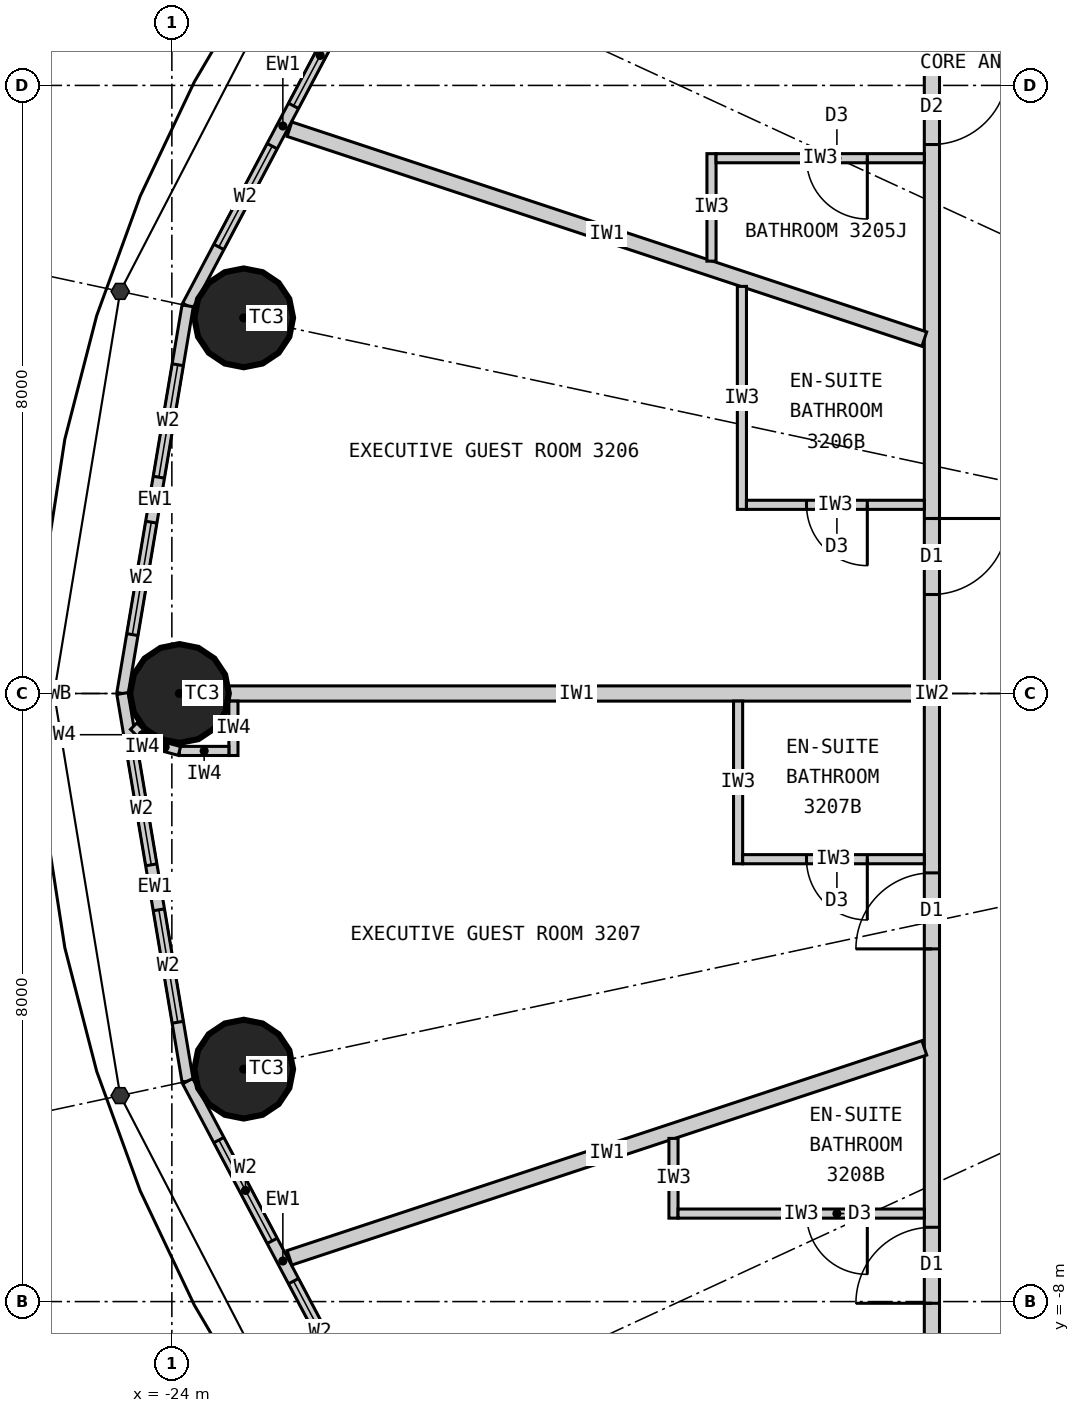
"""IFC4 building model, lengths in metres.
Left out: names, types, materials, properties, quantities, classifications, styles, units other than length and angle.
Written with IfcOpenShell. Run it as: python <this file> out.ifc"""

import sys

from ifc_helpers import new_model, si_unit, direction, frame, frame_2d, origin, origin_2d, place, context, subcontext, project, spatial, rectangle, circle, extrude, element, fill, save


model = new_model("IFC4")
c1 = context("Model", 3, precision=1e-05, world=origin(), true_north=direction((0.0, 1.0)))
c2 = subcontext(c1, "Body", "Model", "MODEL_VIEW")
j1 = project(units=[si_unit("LENGTHUNIT", "METRE"), si_unit("PLANEANGLEUNIT", "RADIAN")], contexts=[c1])
p1 = place(None, origin())
s1 = spatial("IfcSite", under=j1, at=p1, CompositionType="ELEMENT")
p2 = place(p1, origin())
s2 = spatial("IfcBuilding", under=s1, at=p2, CompositionType="ELEMENT")
p3 = place(p2, frame((0.0, 0.0, 125.4)))
s3 = spatial("IfcBuildingStorey", under=s2, at=p3, CompositionType="ELEMENT", Elevation=125.4)
for number, where, z_axis, x_axis in (
    (1, (-23.055, 4.942, 0.0), (0.0, 0.0, 1.0), (1.0, 0.0, 0.0)),
    (2, (-23.9, 0.0, 0.0), (0.0, 0.0, 1.0), (1.0, 0.0, 0.0)),
    (3, (-23.055, -4.942, 0.0), (0.0, 0.0, 1.0), (1.0, 0.0, 0.0)),
):
    element("IfcColumn", number, at=place(p3, frame(where, z_axis=z_axis, x_axis=x_axis)), inside=s3, PredefinedType="COLUMN", context=c2, shape_type="SweptSolid", body=[
        extrude(circle(Radius=0.65, at=origin_2d()), origin(), (0.0, 0.0, 1.0), 3.3),
    ])
p4 = place(p3, frame((-21.287, 9.832, 0.0), z_axis=(0.0, 0.0, 1.0), x_axis=(-0.467814388454, -0.883826735257, 0.0)))
e4 = element("IfcWall", 4, at=p4, inside=s3, PredefinedType="ELEMENTEDWALL", context=c2, shape_type="SweptSolid", body=[
    extrude(rectangle(XDim=5.354, YDim=0.15, at=frame_2d((2.677, 0.0))), origin(), (0.0, 0.0, 1.0), 3.12),
])
p5 = place(p4, frame((0.877, 0.0, 0.9)))
e5 = element("IfcOpeningElement", 5, at=p5, cuts=e4, PredefinedType="OPENING", context=c2, shape_type="SweptSolid", body=[
    extrude(rectangle(XDim=1.5, YDim=1.9, at=frame_2d((0.75, 0.95))), frame((0.0, 0.085, 0.0), z_axis=(0.0, -1.0, 0.0), x_axis=(1.0, 0.0, 0.0)), (0.0, 0.0, 1.0), 0.17),
])
p6 = place(p4, frame((2.977, 0.0, 0.9)))
e6 = element("IfcOpeningElement", 6, at=p6, cuts=e4, PredefinedType="OPENING", context=c2, shape_type="SweptSolid", body=[
    extrude(rectangle(XDim=1.5, YDim=1.9, at=frame_2d((0.75, 0.95))), frame((0.0, 0.085, 0.0), z_axis=(0.0, -1.0, 0.0), x_axis=(1.0, 0.0, 0.0)), (0.0, 0.0, 1.0), 0.17),
])
p7 = place(p3, frame((-23.792, 5.1, 0.0), z_axis=(0.0, 0.0, 1.0), x_axis=(-0.165883894218, -0.986145290329, 0.0)))
e7 = element("IfcWall", 7, at=p7, inside=s3, PredefinedType="ELEMENTEDWALL", context=c2, shape_type="SweptSolid", body=[
    extrude(rectangle(XDim=5.172, YDim=0.15, at=frame_2d((2.586, 0.0))), origin(), (0.0, 0.0, 1.0), 3.12),
])
p8 = place(p7, frame((0.786, 0.0, 0.9)))
e8 = element("IfcOpeningElement", 8, at=p8, cuts=e7, PredefinedType="OPENING", context=c2, shape_type="SweptSolid", body=[
    extrude(rectangle(XDim=1.5, YDim=1.9, at=frame_2d((0.75, 0.95))), frame((0.0, 0.085, 0.0), z_axis=(0.0, -1.0, 0.0), x_axis=(1.0, 0.0, 0.0)), (0.0, 0.0, 1.0), 0.17),
])
p9 = place(p7, frame((2.886, 0.0, 0.9)))
e9 = element("IfcOpeningElement", 9, at=p9, cuts=e7, PredefinedType="OPENING", context=c2, shape_type="SweptSolid", body=[
    extrude(rectangle(XDim=1.5, YDim=1.9, at=frame_2d((0.75, 0.95))), frame((0.0, 0.085, 0.0), z_axis=(0.0, -1.0, 0.0), x_axis=(1.0, 0.0, 0.0)), (0.0, 0.0, 1.0), 0.17),
])
p10 = place(p3, frame((-24.65, 0.0, 0.0), z_axis=(0.0, 0.0, 1.0), x_axis=(0.165883894218, -0.986145290329, 0.0)))
e10 = element("IfcWall", 10, at=p10, inside=s3, PredefinedType="ELEMENTEDWALL", context=c2, shape_type="SweptSolid", body=[
    extrude(rectangle(XDim=5.172, YDim=0.15, at=frame_2d((2.586, 0.0))), origin(), (0.0, 0.0, 1.0), 3.12),
])
p11 = place(p10, frame((0.786, 0.0, 0.9)))
e11 = element("IfcOpeningElement", 11, at=p11, cuts=e10, PredefinedType="OPENING", context=c2, shape_type="SweptSolid", body=[
    extrude(rectangle(XDim=1.5, YDim=1.9, at=frame_2d((0.75, 0.95))), frame((0.0, 0.085, 0.0), z_axis=(0.0, -1.0, 0.0), x_axis=(1.0, 0.0, 0.0)), (0.0, 0.0, 1.0), 0.17),
])
p12 = place(p10, frame((2.886, 0.0, 0.9)))
e12 = element("IfcOpeningElement", 12, at=p12, cuts=e10, PredefinedType="OPENING", context=c2, shape_type="SweptSolid", body=[
    extrude(rectangle(XDim=1.5, YDim=1.9, at=frame_2d((0.75, 0.95))), frame((0.0, 0.085, 0.0), z_axis=(0.0, -1.0, 0.0), x_axis=(1.0, 0.0, 0.0)), (0.0, 0.0, 1.0), 0.17),
])
p13 = place(p3, frame((-23.792, -5.1, 0.0), z_axis=(0.0, 0.0, 1.0), x_axis=(0.467814388454, -0.883826735257, 0.0)))
e13 = element("IfcWall", 13, at=p13, inside=s3, PredefinedType="ELEMENTEDWALL", context=c2, shape_type="SweptSolid", body=[
    extrude(rectangle(XDim=5.354, YDim=0.15, at=frame_2d((2.677, 0.0))), origin(), (0.0, 0.0, 1.0), 3.12),
])
p14 = place(p13, frame((0.877, 0.0, 0.9)))
e14 = element("IfcOpeningElement", 14, at=p14, cuts=e13, PredefinedType="OPENING", context=c2, shape_type="SweptSolid", body=[
    extrude(rectangle(XDim=1.5, YDim=1.9, at=frame_2d((0.75, 0.95))), frame((0.0, 0.085, 0.0), z_axis=(0.0, -1.0, 0.0), x_axis=(1.0, 0.0, 0.0)), (0.0, 0.0, 1.0), 0.17),
])
p15 = place(p13, frame((2.977, 0.0, 0.9)))
e15 = element("IfcOpeningElement", 15, at=p15, cuts=e13, PredefinedType="OPENING", context=c2, shape_type="SweptSolid", body=[
    extrude(rectangle(XDim=1.5, YDim=1.9, at=frame_2d((0.75, 0.95))), frame((0.0, 0.085, 0.0), z_axis=(0.0, -1.0, 0.0), x_axis=(1.0, 0.0, 0.0)), (0.0, 0.0, 1.0), 0.17),
])
p16 = place(p3, frame((-14.0, 9.9, 0.0), z_axis=(0.0, 0.0, 1.0), x_axis=(0.0, -1.0, 0.0)))
e16 = element("IfcWall", 16, at=p16, inside=s3, PredefinedType="PARTITIONING", context=c2, shape_type="SweptSolid", body=[
    extrude(rectangle(XDim=19.8, YDim=0.2, at=frame_2d((9.9, 0.0))), origin(), (0.0, 0.0, 1.0), 3.12),
])
p17 = place(p16, frame((1.678, 0.0, 0.0)))
e17 = element("IfcOpeningElement", 17, at=p17, cuts=e16, PredefinedType="OPENING", context=c2, shape_type="SweptSolid", body=[
    extrude(rectangle(XDim=1.0, YDim=2.2, at=frame_2d((0.5, 1.1))), frame((0.0, 0.11, 0.0), z_axis=(0.0, -1.0, 0.0), x_axis=(1.0, 0.0, 0.0)), (0.0, 0.0, 1.0), 0.22),
])
p18 = place(p16, frame((7.598, 0.0, 0.0)))
e18 = element("IfcOpeningElement", 18, at=p18, cuts=e16, PredefinedType="OPENING", context=c2, shape_type="SweptSolid", body=[
    extrude(rectangle(XDim=1.0, YDim=2.2, at=frame_2d((0.5, 1.1))), frame((0.0, 0.11, 0.0), z_axis=(0.0, -1.0, 0.0), x_axis=(1.0, 0.0, 0.0)), (0.0, 0.0, 1.0), 0.22),
])
p19 = place(p16, frame((12.26, 0.0, 0.0)))
e19 = element("IfcOpeningElement", 19, at=p19, cuts=e16, PredefinedType="OPENING", context=c2, shape_type="SweptSolid", body=[
    extrude(rectangle(XDim=1.0, YDim=2.2, at=frame_2d((0.5, 1.1))), frame((0.0, 0.11, 0.0), z_axis=(0.0, -1.0, 0.0), x_axis=(1.0, 0.0, 0.0)), (0.0, 0.0, 1.0), 0.22),
])
p20 = place(p16, frame((16.922, 0.0, 0.0)))
e20 = element("IfcOpeningElement", 20, at=p20, cuts=e16, PredefinedType="OPENING", context=c2, shape_type="SweptSolid", body=[
    extrude(rectangle(XDim=1.0, YDim=2.2, at=frame_2d((0.5, 1.1))), frame((0.0, 0.11, 0.0), z_axis=(0.0, -1.0, 0.0), x_axis=(1.0, 0.0, 0.0)), (0.0, 0.0, 1.0), 0.22),
])
p21 = place(p3, frame((-14.1, 4.662, 0.0), z_axis=(0.0, 0.0, 1.0), x_axis=(-0.949446466373, 0.313928984789, 0.0)))
e21 = element("IfcWall", 21, at=p21, inside=s3, PredefinedType="PARTITIONING", context=c2, shape_type="SweptSolid", body=[
    extrude(rectangle(XDim=8.797, YDim=0.2, at=frame_2d((4.399, 0.0))), origin(), (0.0, 0.0, 1.0), 3.12),
])
p22 = place(p3, frame((-14.1, 0.0, 0.0), z_axis=(0.0, 0.0, 1.0), x_axis=(-1.0, 0.0, 0.0)))
e22 = element("IfcWall", 22, at=p22, inside=s3, PredefinedType="PARTITIONING", context=c2, shape_type="SweptSolid", body=[
    extrude(rectangle(XDim=9.15, YDim=0.2, at=frame_2d((4.575, 0.0))), origin(), (0.0, 0.0, 1.0), 2.32),
])
p23 = place(p3, frame((-14.1, -4.662, 0.0), z_axis=(0.0, 0.0, 1.0), x_axis=(-0.949446466373, -0.313928984789, 0.0)))
e23 = element("IfcWall", 23, at=p23, inside=s3, PredefinedType="PARTITIONING", context=c2, shape_type="SweptSolid", body=[
    extrude(rectangle(XDim=8.797, YDim=0.2, at=frame_2d((4.399, 0.0))), origin(), (0.0, 0.0, 1.0), 3.12),
])
p24 = place(p3, frame((-16.9, 5.688, 0.0), z_axis=(0.0, 0.0, 1.0), x_axis=(0.0, 1.0, 0.0)))
e24 = element("IfcWall", 24, at=p24, inside=s3, PredefinedType="PARTITIONING", context=c2, shape_type="SweptSolid", body=[
    extrude(rectangle(XDim=1.414, YDim=0.12, at=frame_2d((0.707, 0.0))), origin(), (0.0, 0.0, 1.0), 3.12),
])
p25 = place(p3, frame((-14.1, 7.042, 0.0), z_axis=(0.0, 0.0, 1.0), x_axis=(-1.0, 0.0, 0.0)))
e25 = element("IfcWall", 25, at=p25, inside=s3, PredefinedType="PARTITIONING", context=c2, shape_type="SweptSolid", body=[
    extrude(rectangle(XDim=2.74, YDim=0.12, at=frame_2d((1.37, 0.0))), origin(), (0.0, 0.0, 1.0), 3.12),
])
p26 = place(p25, frame((0.75, 0.0, 0.0)))
e26 = element("IfcOpeningElement", 26, at=p26, cuts=e25, PredefinedType="OPENING", context=c2, shape_type="SweptSolid", body=[
    extrude(rectangle(XDim=0.8, YDim=2.1, at=frame_2d((0.4, 1.05))), frame((0.0, 0.07, 0.0), z_axis=(0.0, -1.0, 0.0), x_axis=(1.0, 0.0, 0.0)), (0.0, 0.0, 1.0), 0.14),
])
p27 = place(p3, frame((-16.5, 5.356, 0.0), z_axis=(0.0, 0.0, 1.0), x_axis=(0.0, -1.0, 0.0)))
e27 = element("IfcWall", 27, at=p27, inside=s3, PredefinedType="PARTITIONING", context=c2, shape_type="SweptSolid", body=[
    extrude(rectangle(XDim=2.934, YDim=0.12, at=frame_2d((1.467, 0.0))), origin(), (0.0, 0.0, 1.0), 3.12),
])
p28 = place(p3, frame((-14.1, 2.482, 0.0), z_axis=(0.0, 0.0, 1.0), x_axis=(-1.0, 0.0, 0.0)))
e28 = element("IfcWall", 28, at=p28, inside=s3, PredefinedType="PARTITIONING", context=c2, shape_type="SweptSolid", body=[
    extrude(rectangle(XDim=2.34, YDim=0.12, at=frame_2d((1.17, 0.0))), origin(), (0.0, 0.0, 1.0), 3.12),
])
p29 = place(p28, frame((0.75, 0.0, 0.0)))
e29 = element("IfcOpeningElement", 29, at=p29, cuts=e28, PredefinedType="OPENING", context=c2, shape_type="SweptSolid", body=[
    extrude(rectangle(XDim=0.8, YDim=2.1, at=frame_2d((0.4, 1.05))), frame((0.0, 0.07, 0.0), z_axis=(0.0, -1.0, 0.0), x_axis=(1.0, 0.0, 0.0)), (0.0, 0.0, 1.0), 0.14),
])
p30 = place(p3, frame((-16.55, -0.1, 0.0), z_axis=(0.0, 0.0, 1.0), x_axis=(0.0, -1.0, 0.0)))
e30 = element("IfcWall", 30, at=p30, inside=s3, PredefinedType="PARTITIONING", context=c2, shape_type="SweptSolid", body=[
    extrude(rectangle(XDim=2.14, YDim=0.12, at=frame_2d((1.07, 0.0))), origin(), (0.0, 0.0, 1.0), 3.12),
])
p31 = place(p3, frame((-14.1, -2.18, 0.0), z_axis=(0.0, 0.0, 1.0), x_axis=(-1.0, 0.0, 0.0)))
e31 = element("IfcWall", 31, at=p31, inside=s3, PredefinedType="PARTITIONING", context=c2, shape_type="SweptSolid", body=[
    extrude(rectangle(XDim=2.39, YDim=0.12, at=frame_2d((1.195, 0.0))), origin(), (0.0, 0.0, 1.0), 3.12),
])
p32 = place(p31, frame((0.75, 0.0, 0.0)))
e32 = element("IfcOpeningElement", 32, at=p32, cuts=e31, PredefinedType="OPENING", context=c2, shape_type="SweptSolid", body=[
    extrude(rectangle(XDim=0.8, YDim=2.1, at=frame_2d((0.4, 1.05))), frame((0.0, 0.07, 0.0), z_axis=(0.0, -1.0, 0.0), x_axis=(1.0, 0.0, 0.0)), (0.0, 0.0, 1.0), 0.14),
])
p33 = place(p3, frame((-17.4, -5.854, 0.0), z_axis=(0.0, 0.0, 1.0), x_axis=(0.0, -1.0, 0.0)))
e33 = element("IfcWall", 33, at=p33, inside=s3, PredefinedType="PARTITIONING", context=c2, shape_type="SweptSolid", body=[
    extrude(rectangle(XDim=1.049, YDim=0.12, at=frame_2d((0.524, 0.0))), origin(), (0.0, 0.0, 1.0), 3.12),
])
p34 = place(p3, frame((-14.1, -6.842, 0.0), z_axis=(0.0, 0.0, 1.0), x_axis=(-1.0, 0.0, 0.0)))
e34 = element("IfcWall", 34, at=p34, inside=s3, PredefinedType="PARTITIONING", context=c2, shape_type="SweptSolid", body=[
    extrude(rectangle(XDim=3.24, YDim=0.12, at=frame_2d((1.62, 0.0))), origin(), (0.0, 0.0, 1.0), 3.12),
])
p35 = place(p34, frame((0.75, 0.0, 0.0)))
e35 = element("IfcOpeningElement", 35, at=p35, cuts=e34, PredefinedType="OPENING", context=c2, shape_type="SweptSolid", body=[
    extrude(rectangle(XDim=0.8, YDim=2.1, at=frame_2d((0.4, 1.05))), frame((0.0, 0.07, 0.0), z_axis=(0.0, -1.0, 0.0), x_axis=(1.0, 0.0, 0.0)), (0.0, 0.0, 1.0), 0.14),
])
p36 = place(p3, frame((-23.19, -0.1, 0.0), z_axis=(0.0, 0.0, 1.0), x_axis=(0.0, -1.0, 0.0)))
e36 = element("IfcWall", 36, at=p36, inside=s3, PredefinedType="PARTITIONING", context=c2, shape_type="SweptSolid", body=[
    extrude(rectangle(XDim=0.716, YDim=0.12, at=frame_2d((0.358, 0.0))), origin(), (0.0, 0.0, 1.0), 3.12),
])
p37 = place(p3, frame((-23.25, -0.756, 0.0), z_axis=(0.0, 0.0, 1.0), x_axis=(-1.0, 0.0, 0.0)))
e37 = element("IfcWall", 37, at=p37, inside=s3, PredefinedType="PARTITIONING", context=c2, shape_type="SweptSolid", body=[
    extrude(rectangle(XDim=0.65, YDim=0.12, at=frame_2d((0.325, 0.0))), origin(), (0.0, 0.0, 1.0), 3.12),
])
p38 = place(p3, frame((-23.9, -0.756, 0.0), z_axis=(0.0, 0.0, 1.0), x_axis=(-0.965892334856, 0.2589440045, 0.0)))
e38 = element("IfcWall", 38, at=p38, inside=s3, PredefinedType="PARTITIONING", context=c2, shape_type="SweptSolid", body=[
    extrude(rectangle(XDim=0.391, YDim=0.12, at=frame_2d((0.196, 0.0))), origin(), (0.0, 0.0, 1.0), 3.12),
])
p39 = place(p3, frame((-24.278, -0.655, 0.0), z_axis=(0.0, 0.0, 1.0), x_axis=(-0.707106781187, 0.707106781187, 0.0)))
e39 = element("IfcWall", 39, at=p39, inside=s3, PredefinedType="PARTITIONING", context=c2, shape_type="SweptSolid", body=[
    extrude(rectangle(XDim=0.318, YDim=0.12, at=frame_2d((0.159, 0.0))), origin(), (0.0, 0.0, 1.0), 3.12),
])
p40 = place(p5, origin())
e40 = element("IfcWindow", 40, at=p40, inside=s3, PartitioningType="SINGLE_PANEL", PredefinedType="WINDOW", context=c2, shape_type="SweptSolid", body=[
    extrude(rectangle(XDim=1.5, YDim=1.9, at=frame_2d((0.75, 0.95))), frame((0.0, 0.03, 0.0), z_axis=(0.0, -1.0, 0.0), x_axis=(1.0, 0.0, 0.0)), (0.0, 0.0, 1.0), 0.06),
])
fill(e5, e40)
p41 = place(p6, origin())
e41 = element("IfcWindow", 41, at=p41, inside=s3, PartitioningType="SINGLE_PANEL", PredefinedType="WINDOW", context=c2, shape_type="SweptSolid", body=[
    extrude(rectangle(XDim=1.5, YDim=1.9, at=frame_2d((0.75, 0.95))), frame((0.0, 0.03, 0.0), z_axis=(0.0, -1.0, 0.0), x_axis=(1.0, 0.0, 0.0)), (0.0, 0.0, 1.0), 0.06),
])
fill(e6, e41)
p42 = place(p8, origin())
e42 = element("IfcWindow", 42, at=p42, inside=s3, PartitioningType="SINGLE_PANEL", PredefinedType="WINDOW", context=c2, shape_type="SweptSolid", body=[
    extrude(rectangle(XDim=1.5, YDim=1.9, at=frame_2d((0.75, 0.95))), frame((0.0, 0.03, 0.0), z_axis=(0.0, -1.0, 0.0), x_axis=(1.0, 0.0, 0.0)), (0.0, 0.0, 1.0), 0.06),
])
fill(e8, e42)
p43 = place(p9, origin())
e43 = element("IfcWindow", 43, at=p43, inside=s3, PartitioningType="SINGLE_PANEL", PredefinedType="WINDOW", context=c2, shape_type="SweptSolid", body=[
    extrude(rectangle(XDim=1.5, YDim=1.9, at=frame_2d((0.75, 0.95))), frame((0.0, 0.03, 0.0), z_axis=(0.0, -1.0, 0.0), x_axis=(1.0, 0.0, 0.0)), (0.0, 0.0, 1.0), 0.06),
])
fill(e9, e43)
p44 = place(p11, origin())
e44 = element("IfcWindow", 44, at=p44, inside=s3, PartitioningType="SINGLE_PANEL", PredefinedType="WINDOW", context=c2, shape_type="SweptSolid", body=[
    extrude(rectangle(XDim=1.5, YDim=1.9, at=frame_2d((0.75, 0.95))), frame((0.0, 0.03, 0.0), z_axis=(0.0, -1.0, 0.0), x_axis=(1.0, 0.0, 0.0)), (0.0, 0.0, 1.0), 0.06),
])
fill(e11, e44)
p45 = place(p12, origin())
e45 = element("IfcWindow", 45, at=p45, inside=s3, PartitioningType="SINGLE_PANEL", PredefinedType="WINDOW", context=c2, shape_type="SweptSolid", body=[
    extrude(rectangle(XDim=1.5, YDim=1.9, at=frame_2d((0.75, 0.95))), frame((0.0, 0.03, 0.0), z_axis=(0.0, -1.0, 0.0), x_axis=(1.0, 0.0, 0.0)), (0.0, 0.0, 1.0), 0.06),
])
fill(e12, e45)
p46 = place(p14, origin())
e46 = element("IfcWindow", 46, at=p46, inside=s3, PartitioningType="SINGLE_PANEL", PredefinedType="WINDOW", context=c2, shape_type="SweptSolid", body=[
    extrude(rectangle(XDim=1.5, YDim=1.9, at=frame_2d((0.75, 0.95))), frame((0.0, 0.03, 0.0), z_axis=(0.0, -1.0, 0.0), x_axis=(1.0, 0.0, 0.0)), (0.0, 0.0, 1.0), 0.06),
])
fill(e14, e46)
p47 = place(p15, origin())
e47 = element("IfcWindow", 47, at=p47, inside=s3, PartitioningType="SINGLE_PANEL", PredefinedType="WINDOW", context=c2, shape_type="SweptSolid", body=[
    extrude(rectangle(XDim=1.5, YDim=1.9, at=frame_2d((0.75, 0.95))), frame((0.0, 0.03, 0.0), z_axis=(0.0, -1.0, 0.0), x_axis=(1.0, 0.0, 0.0)), (0.0, 0.0, 1.0), 0.06),
])
fill(e15, e47)
p48 = place(p26, origin())
e48 = element("IfcDoor", 48, at=p48, inside=s3, OperationType="SINGLE_SWING_LEFT", PredefinedType="DOOR", context=c2, shape_type="SweptSolid", body=[
    extrude(rectangle(XDim=0.8, YDim=2.1, at=frame_2d((0.4, 1.05))), frame((0.0, 0.025, 0.0), z_axis=(0.0, -1.0, 0.0), x_axis=(1.0, 0.0, 0.0)), (0.0, 0.0, 1.0), 0.05),
])
fill(e26, e48)
p49 = place(p17, origin())
e49 = element("IfcDoor", 49, at=p49, inside=s3, OperationType="SINGLE_SWING_LEFT", PredefinedType="DOOR", context=c2, shape_type="SweptSolid", body=[
    extrude(rectangle(XDim=1.0, YDim=2.2, at=frame_2d((0.5, 1.1))), frame((0.0, 0.025, 0.0), z_axis=(0.0, -1.0, 0.0), x_axis=(1.0, 0.0, 0.0)), (0.0, 0.0, 1.0), 0.05),
])
fill(e17, e49)
p50 = place(p29, origin())
e50 = element("IfcDoor", 50, at=p50, inside=s3, OperationType="SINGLE_SWING_LEFT", PredefinedType="DOOR", context=c2, shape_type="SweptSolid", body=[
    extrude(rectangle(XDim=0.8, YDim=2.1, at=frame_2d((0.4, 1.05))), frame((0.0, 0.025, 0.0), z_axis=(0.0, -1.0, 0.0), x_axis=(1.0, 0.0, 0.0)), (0.0, 0.0, 1.0), 0.05),
])
fill(e29, e50)
p51 = place(p18, origin())
e51 = element("IfcDoor", 51, at=p51, inside=s3, OperationType="SINGLE_SWING_LEFT", PredefinedType="DOOR", context=c2, shape_type="SweptSolid", body=[
    extrude(rectangle(XDim=1.0, YDim=2.2, at=frame_2d((0.5, 1.1))), frame((0.0, 0.025, 0.0), z_axis=(0.0, -1.0, 0.0), x_axis=(1.0, 0.0, 0.0)), (0.0, 0.0, 1.0), 0.05),
])
fill(e18, e51)
p52 = place(p32, origin())
e52 = element("IfcDoor", 52, at=p52, inside=s3, OperationType="SINGLE_SWING_LEFT", PredefinedType="DOOR", context=c2, shape_type="SweptSolid", body=[
    extrude(rectangle(XDim=0.8, YDim=2.1, at=frame_2d((0.4, 1.05))), frame((0.0, 0.025, 0.0), z_axis=(0.0, -1.0, 0.0), x_axis=(1.0, 0.0, 0.0)), (0.0, 0.0, 1.0), 0.05),
])
fill(e32, e52)
p53 = place(p19, origin())
e53 = element("IfcDoor", 53, at=p53, inside=s3, OperationType="SINGLE_SWING_RIGHT", PredefinedType="DOOR", context=c2, shape_type="SweptSolid", body=[
    extrude(rectangle(XDim=1.0, YDim=2.2, at=frame_2d((0.5, 1.1))), frame((0.0, 0.025, 0.0), z_axis=(0.0, -1.0, 0.0), x_axis=(1.0, 0.0, 0.0)), (0.0, 0.0, 1.0), 0.05),
])
fill(e19, e53)
p54 = place(p35, origin())
e54 = element("IfcDoor", 54, at=p54, inside=s3, OperationType="SINGLE_SWING_LEFT", PredefinedType="DOOR", context=c2, shape_type="SweptSolid", body=[
    extrude(rectangle(XDim=0.8, YDim=2.1, at=frame_2d((0.4, 1.05))), frame((0.0, 0.025, 0.0), z_axis=(0.0, -1.0, 0.0), x_axis=(1.0, 0.0, 0.0)), (0.0, 0.0, 1.0), 0.05),
])
fill(e35, e54)
p55 = place(p20, origin())
e55 = element("IfcDoor", 55, at=p55, inside=s3, OperationType="SINGLE_SWING_RIGHT", PredefinedType="DOOR", context=c2, shape_type="SweptSolid", body=[
    extrude(rectangle(XDim=1.0, YDim=2.2, at=frame_2d((0.5, 1.1))), frame((0.0, 0.025, 0.0), z_axis=(0.0, -1.0, 0.0), x_axis=(1.0, 0.0, 0.0)), (0.0, 0.0, 1.0), 0.05),
])
fill(e20, e55)
save(model, sys.argv[1])
